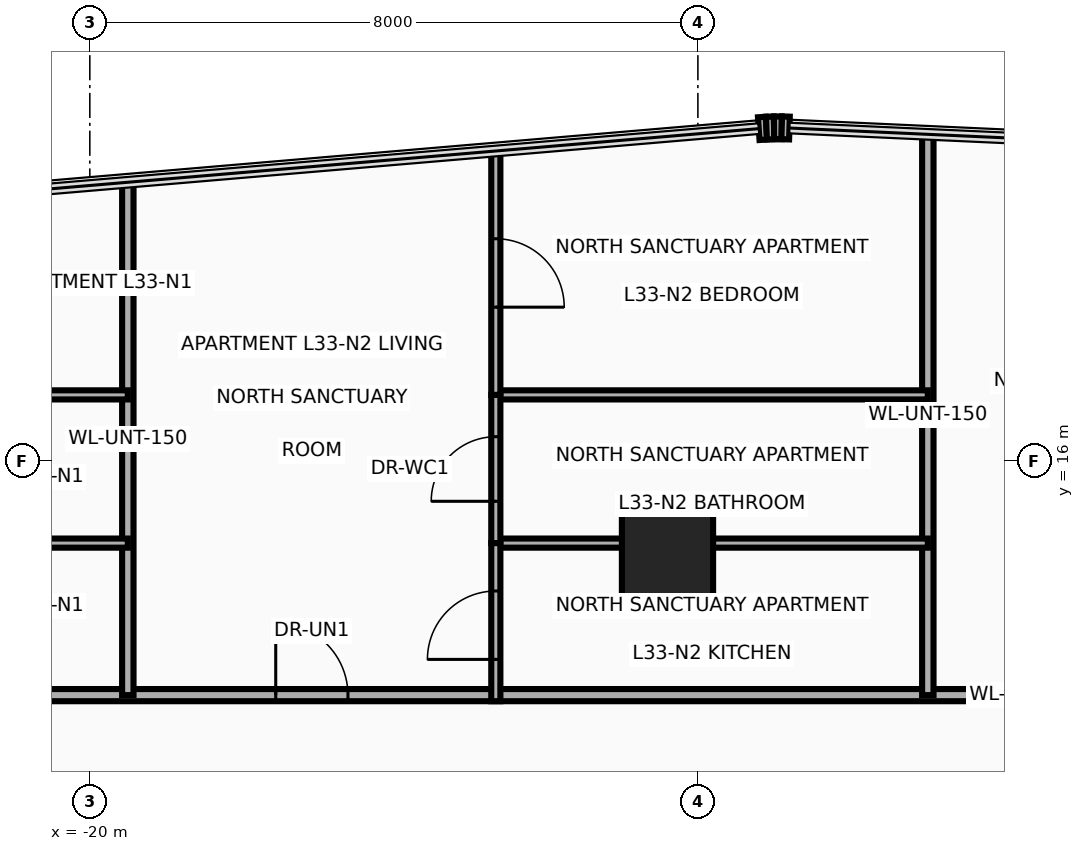
"""IFC4 building model, lengths in metres.
Left out: names, types, materials, properties, quantities, classifications, styles, units other than length and angle.
Written with IfcOpenShell. Run it as: python <this file> out.ifc"""

import sys

from ifc_helpers import new_model, si_unit, direction, frame, frame_2d, origin, origin_2d, place, context, subcontext, project, spatial, rectangle, extrude, source, transform, mapped, element, fill, save


model = new_model("IFC4")
c1 = context("Model", 3, precision=1e-05, world=origin(), true_north=direction((0.0, 1.0)))
c2 = subcontext(c1, "Body", "Model", "MODEL_VIEW")
j1 = project(units=[si_unit("LENGTHUNIT", "METRE"), si_unit("PLANEANGLEUNIT", "RADIAN")], contexts=[c1])
p1 = place(None, origin())
s1 = spatial("IfcSite", under=j1, at=p1, CompositionType="ELEMENT")
p2 = place(p1, origin())
s2 = spatial("IfcBuilding", under=s1, at=p2, CompositionType="ELEMENT")
p3 = place(p2, frame((0.0, 0.0, 131.6)))
s3 = spatial("IfcBuildingStorey", under=s2, at=p3, CompositionType="ELEMENT", Elevation=131.6)
m1 = source(origin(), c2, "Body", "SweptSolid", [
    extrude(rectangle(XDim=1.2, YDim=1.2, at=origin_2d()), origin(), (0.0, 0.0, 1.0), 3.7),
])
p4 = place(p3, frame((-12.4, 14.8, 0.0), z_axis=(0.0, 0.0, 1.0), x_axis=(1.0, 0.0, 0.0)))
e1 = element("IfcColumn", 1, at=p4, inside=s3, PredefinedType="COLUMN", context=c2, shape_type="MappedRepresentation", body=[
    mapped(m1, transform((0.0, 0.0, 0.0), x_axis=(1.0, 0.0, 0.0), y_axis=(0.0, 1.0, 0.0), z_axis=(0.0, 0.0, 1.0), scale=1.0)),
])
p5 = place(p3, frame((-11.199, 20.373, 0.0), z_axis=(0.0, 0.0, 1.0), x_axis=(0.997567332166, 0.069709524416, 0.0)))
e2 = element("IfcWall", 2, at=p5, inside=s3, PredefinedType="SOLIDWALL", context=c2, shape_type="SweptSolid", body=[
    extrude(rectangle(XDim=0.102, YDim=0.3, at=frame_2d((0.051, 0.0))), origin(), (0.0, 0.0, 1.0), 3.46),
])
p6 = place(p3, frame((-11.098, 20.38, 0.0), z_axis=(0.0, 0.0, 1.0), x_axis=(0.999334672785, 0.03647206835, 0.0)))
e3 = element("IfcWall", 3, at=p6, inside=s3, PredefinedType="SOLIDWALL", context=c2, shape_type="SweptSolid", body=[
    extrude(rectangle(XDim=0.1, YDim=0.3, at=frame_2d((0.05, 0.0))), origin(), (0.0, 0.0, 1.0), 3.46),
])
p7 = place(p3, frame((-10.998, 20.383, 0.0), z_axis=(0.0, 0.0, 1.0), x_axis=(0.999997054401, 0.002427177317, 0.0)))
e4 = element("IfcWall", 4, at=p7, inside=s3, PredefinedType="SOLIDWALL", context=c2, shape_type="SweptSolid", body=[
    extrude(rectangle(XDim=0.101, YDim=0.3, at=frame_2d((0.05, 0.0))), origin(), (0.0, 0.0, 1.0), 3.46),
])
p8 = place(p3, frame((-10.897, 20.384, 0.0), z_axis=(0.0, 0.0, 1.0), x_axis=(0.999584209171, -0.02883415988, 0.0)))
e5 = element("IfcWall", 5, at=p8, inside=s3, PredefinedType="SOLIDWALL", context=c2, shape_type="SweptSolid", body=[
    extrude(rectangle(XDim=0.102, YDim=0.3, at=frame_2d((0.051, 0.0))), origin(), (0.0, 0.0, 1.0), 3.46),
])
p9 = place(p3, frame((-28.25, 12.92, 0.0), z_axis=(0.0, 0.0, 1.0), x_axis=(1.0, 0.0, 0.0)))
e6 = element("IfcWall", 6, at=p9, inside=s3, PredefinedType="PARTITIONING", context=c2, shape_type="SweptSolid", body=[
    extrude(rectangle(XDim=41.8, YDim=0.16, at=frame_2d((20.9, 0.0))), origin(), (0.0, 0.0, 1.0), 2.666),
])
p10 = place(p9, frame((0.763, 0.0, 0.0)))
e7 = element("IfcOpeningElement", 7, at=p10, cuts=e6, PredefinedType="OPENING", context=c2, shape_type="SweptSolid", body=[
    extrude(rectangle(XDim=0.95, YDim=2.15, at=frame_2d((0.475, 1.075))), frame((0.0, 0.095, 0.0), z_axis=(0.0, -1.0, 0.0), x_axis=(1.0, 0.0, 0.0)), (0.0, 0.0, 1.0), 0.19),
])
p11 = place(p9, frame((10.696, 0.0, 0.0)))
e8 = element("IfcOpeningElement", 8, at=p11, cuts=e6, PredefinedType="OPENING", context=c2, shape_type="SweptSolid", body=[
    extrude(rectangle(XDim=0.95, YDim=2.15, at=frame_2d((0.475, 1.075))), frame((0.0, 0.095, 0.0), z_axis=(0.0, -1.0, 0.0), x_axis=(1.0, 0.0, 0.0)), (0.0, 0.0, 1.0), 0.19),
])
p12 = place(p9, frame((22.215, 0.0, 0.0)))
e9 = element("IfcOpeningElement", 9, at=p12, cuts=e6, PredefinedType="OPENING", context=c2, shape_type="SweptSolid", body=[
    extrude(rectangle(XDim=0.95, YDim=2.15, at=frame_2d((0.475, 1.075))), frame((0.0, 0.095, 0.0), z_axis=(0.0, -1.0, 0.0), x_axis=(1.0, 0.0, 0.0)), (0.0, 0.0, 1.0), 0.19),
])
p13 = place(p9, frame((32.652, 0.0, 0.0)))
e10 = element("IfcOpeningElement", 10, at=p13, cuts=e6, PredefinedType="OPENING", context=c2, shape_type="SweptSolid", body=[
    extrude(rectangle(XDim=0.95, YDim=2.15, at=frame_2d((0.475, 1.075))), frame((0.0, 0.095, 0.0), z_axis=(0.0, -1.0, 0.0), x_axis=(1.0, 0.0, 0.0)), (0.0, 0.0, 1.0), 0.19),
])
p14 = place(p3, frame((-19.5, 12.92, 0.0), z_axis=(0.0, 0.0, 1.0), x_axis=(0.0, 1.0, 0.0)))
e11 = element("IfcWall", 11, at=p14, inside=s3, PredefinedType="PARTITIONING", context=c2, shape_type="SweptSolid", body=[
    extrude(rectangle(XDim=6.747, YDim=0.15, at=frame_2d((3.374, 0.0))), origin(), (0.0, 0.0, 1.0), 2.666),
])
p15 = place(p3, frame((-8.975, 12.92, 0.0), z_axis=(0.0, 0.0, 1.0), x_axis=(0.0, 1.0, 0.0)))
e12 = element("IfcWall", 12, at=p15, inside=s3, PredefinedType="PARTITIONING", context=c2, shape_type="SweptSolid", body=[
    extrude(rectangle(XDim=7.378, YDim=0.15, at=frame_2d((3.689, 0.0))), origin(), (0.0, 0.0, 1.0), 2.666),
])
p16 = place(p3, frame((-25.775, 14.92, 0.0), z_axis=(0.0, 0.0, 1.0), x_axis=(1.0, 0.0, 0.0)))
e13 = element("IfcWall", 13, at=p16, inside=s3, PredefinedType="PARTITIONING", context=c2, shape_type="SweptSolid", body=[
    extrude(rectangle(XDim=6.275, YDim=0.12, at=frame_2d((3.137, 0.0))), origin(), (0.0, 0.0, 1.0), 2.666),
])
p17 = place(p3, frame((-25.775, 16.87, 0.0), z_axis=(0.0, 0.0, 1.0), x_axis=(1.0, 0.0, 0.0)))
e14 = element("IfcWall", 14, at=p17, inside=s3, PredefinedType="PARTITIONING", context=c2, shape_type="SweptSolid", body=[
    extrude(rectangle(XDim=6.275, YDim=0.12, at=frame_2d((3.137, 0.0))), origin(), (0.0, 0.0, 1.0), 3.46),
])
p18 = place(p3, frame((-14.658, 14.92, 0.0), z_axis=(0.0, 0.0, 1.0), x_axis=(1.0, 0.0, 0.0)))
e15 = element("IfcWall", 15, at=p18, inside=s3, PredefinedType="PARTITIONING", context=c2, shape_type="SweptSolid", body=[
    extrude(rectangle(XDim=5.683, YDim=0.12, at=frame_2d((2.842, 0.0))), origin(), (0.0, 0.0, 1.0), 2.666),
])
p19 = place(p3, frame((-14.658, 16.87, 0.0), z_axis=(0.0, 0.0, 1.0), x_axis=(1.0, 0.0, 0.0)))
e16 = element("IfcWall", 16, at=p19, inside=s3, PredefinedType="PARTITIONING", context=c2, shape_type="SweptSolid", body=[
    extrude(rectangle(XDim=5.683, YDim=0.12, at=frame_2d((2.842, 0.0))), origin(), (0.0, 0.0, 1.0), 3.46),
])
p20 = place(p3, frame((-14.658, 14.92, 0.0), z_axis=(0.0, 0.0, 1.0), x_axis=(0.0, 1.0, 0.0)))
e17 = element("IfcWall", 17, at=p20, inside=s3, PredefinedType="PARTITIONING", context=c2, shape_type="SweptSolid", body=[
    extrude(rectangle(XDim=1.95, YDim=0.12, at=frame_2d((0.975, 0.0))), origin(), (0.0, 0.0, 1.0), 2.666),
])
p21 = place(p20, frame((0.55, 0.0, 0.0)))
e18 = element("IfcOpeningElement", 18, at=p21, cuts=e17, PredefinedType="OPENING", context=c2, shape_type="SweptSolid", body=[
    extrude(rectangle(XDim=0.85, YDim=2.1, at=frame_2d((0.425, 1.05))), frame((0.0, 0.075, 0.0), z_axis=(0.0, -1.0, 0.0), x_axis=(1.0, 0.0, 0.0)), (0.0, 0.0, 1.0), 0.15),
])
p22 = place(p3, frame((-14.658, 12.84, 0.0), z_axis=(0.0, 0.0, 1.0), x_axis=(0.0, 1.0, 0.0)))
e19 = element("IfcWall", 19, at=p22, inside=s3, PredefinedType="PARTITIONING", context=c2, shape_type="SweptSolid", body=[
    extrude(rectangle(XDim=2.08, YDim=0.12, at=frame_2d((1.04, 0.0))), origin(), (0.0, 0.0, 1.0), 2.666),
])
p23 = place(p22, frame((0.55, 0.0, 0.0)))
e20 = element("IfcOpeningElement", 20, at=p23, cuts=e19, PredefinedType="OPENING", context=c2, shape_type="SweptSolid", body=[
    extrude(rectangle(XDim=0.9, YDim=2.1, at=frame_2d((0.45, 1.05))), frame((0.0, 0.075, 0.0), z_axis=(0.0, -1.0, 0.0), x_axis=(1.0, 0.0, 0.0)), (0.0, 0.0, 1.0), 0.15),
])
p24 = place(p3, frame((-14.658, 16.87, 0.0), z_axis=(0.0, 0.0, 1.0), x_axis=(0.0, 1.0, 0.0)))
e21 = element("IfcWall", 21, at=p24, inside=s3, PredefinedType="PARTITIONING", context=c2, shape_type="SweptSolid", body=[
    extrude(rectangle(XDim=3.208, YDim=0.12, at=frame_2d((1.604, 0.0))), origin(), (0.0, 0.0, 1.0), 3.46),
])
p25 = place(p24, frame((1.154, 0.0, 0.0)))
e22 = element("IfcOpeningElement", 22, at=p25, cuts=e21, PredefinedType="OPENING", context=c2, shape_type="SweptSolid", body=[
    extrude(rectangle(XDim=0.9, YDim=2.1, at=frame_2d((0.45, 1.05))), frame((0.0, 0.075, 0.0), z_axis=(0.0, -1.0, 0.0), x_axis=(1.0, 0.0, 0.0)), (0.0, 0.0, 1.0), 0.15),
])
p26 = place(p11, origin())
e23 = element("IfcDoor", 23, at=p26, inside=s3, OperationType="SINGLE_SWING_RIGHT", PredefinedType="DOOR", context=c2, shape_type="SweptSolid", body=[
    extrude(rectangle(XDim=0.95, YDim=2.15, at=frame_2d((0.475, 1.075))), frame((0.0, 0.025, 0.0), z_axis=(0.0, -1.0, 0.0), x_axis=(1.0, 0.0, 0.0)), (0.0, 0.0, 1.0), 0.05),
])
fill(e8, e23)
p27 = place(p21, origin())
e24 = element("IfcDoor", 24, at=p27, inside=s3, OperationType="SINGLE_SWING_LEFT", PredefinedType="DOOR", context=c2, shape_type="SweptSolid", body=[
    extrude(rectangle(XDim=0.85, YDim=2.1, at=frame_2d((0.425, 1.05))), frame((0.0, 0.025, 0.0), z_axis=(0.0, -1.0, 0.0), x_axis=(1.0, 0.0, 0.0)), (0.0, 0.0, 1.0), 0.05),
])
fill(e18, e24)
p28 = place(p23, origin())
e25 = element("IfcDoor", 25, at=p28, inside=s3, OperationType="SINGLE_SWING_RIGHT", PredefinedType="DOOR", context=c2, shape_type="SweptSolid", body=[
    extrude(rectangle(XDim=0.9, YDim=2.1, at=frame_2d((0.45, 1.05))), frame((0.0, 0.025, 0.0), z_axis=(0.0, -1.0, 0.0), x_axis=(1.0, 0.0, 0.0)), (0.0, 0.0, 1.0), 0.05),
])
fill(e20, e25)
p29 = place(p25, frame((0.9, 0.0, 0.0), z_axis=(0.0, 0.0, 1.0), x_axis=(-1.0, 0.0, 0.0)))
e26 = element("IfcDoor", 26, at=p29, inside=s3, OperationType="SINGLE_SWING_LEFT", PredefinedType="DOOR", context=c2, shape_type="SweptSolid", body=[
    extrude(rectangle(XDim=0.9, YDim=2.1, at=frame_2d((0.45, 1.05))), frame((0.0, 0.025, 0.0), z_axis=(0.0, -1.0, 0.0), x_axis=(1.0, 0.0, 0.0)), (0.0, 0.0, 1.0), 0.05),
])
fill(e22, e26)
save(model, sys.argv[1])
